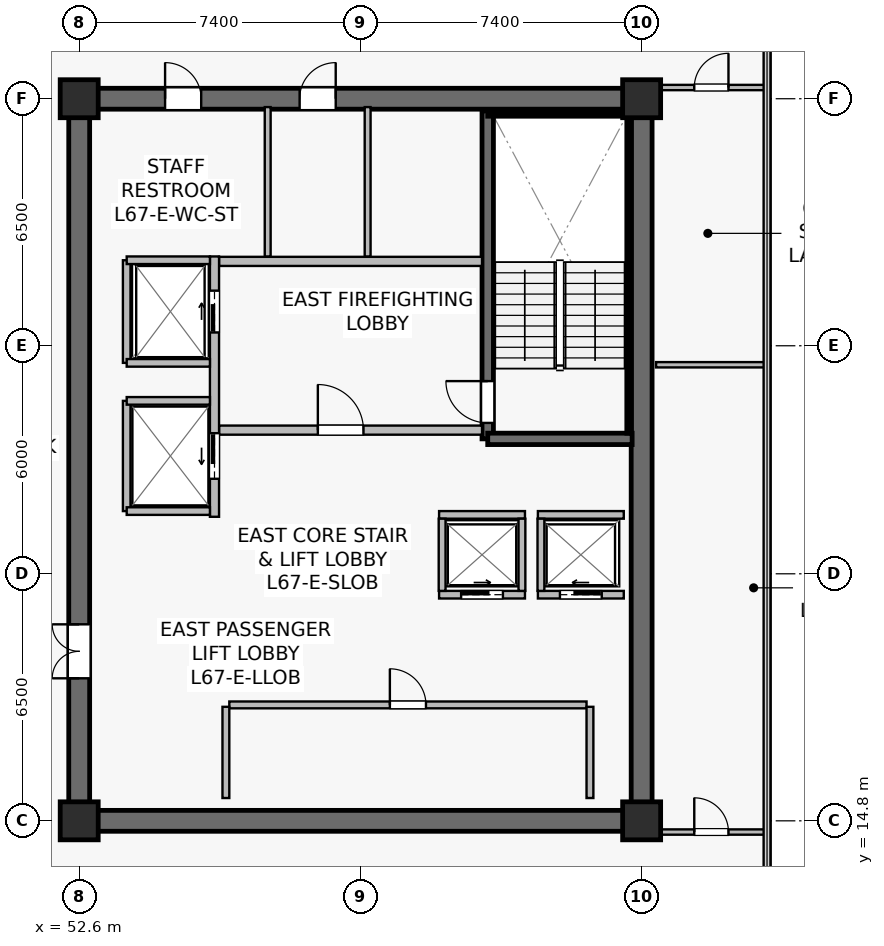
"""IFC4 building model, lengths in metres.
Left out: names, types, materials, properties, quantities, classifications, styles, units other than length and angle.
Written with IfcOpenShell. Run it as: python <this file> out.ifc"""

import sys

from ifc_helpers import new_model, si_unit, direction, frame, frame_2d, origin, origin_2d, place, context, subcontext, project, spatial, rectangle, extrude, source, transform, mapped, element, fill, save


model = new_model("IFC4")
c1 = context("Model", 3, precision=1e-05, world=origin(), true_north=direction((0.0, 1.0)))
c2 = subcontext(c1, "Body", "Model", "MODEL_VIEW")
j1 = project(units=[si_unit("LENGTHUNIT", "METRE"), si_unit("PLANEANGLEUNIT", "RADIAN")], contexts=[c1])
p1 = place(None, origin())
s1 = spatial("IfcSite", under=j1, at=p1, CompositionType="ELEMENT")
p2 = place(p1, origin())
s2 = spatial("IfcBuilding", under=s1, at=p2, CompositionType="ELEMENT")
p3 = place(p2, frame((0.0, 0.0, 279.3)))
s3 = spatial("IfcBuildingStorey", under=s2, at=p3, CompositionType="ELEMENT", Elevation=279.3)
p4 = place(p3, frame((52.325, 14.8, 0.0), z_axis=(0.0, 0.0, 1.0), x_axis=(1.0, 0.0, 0.0)))
e1 = element("IfcWall", 1, at=p4, inside=s3, PredefinedType="SHEAR", context=c2, shape_type="SweptSolid", body=[
    extrude(rectangle(XDim=15.35, YDim=0.55, at=frame_2d((7.675, 0.0))), origin(), (0.0, 0.0, 1.0), 3.8),
])
p5 = place(p3, frame((52.325, 33.8, 0.0), z_axis=(0.0, 0.0, 1.0), x_axis=(1.0, 0.0, 0.0)))
e2 = element("IfcWall", 2, at=p5, inside=s3, PredefinedType="SHEAR", context=c2, shape_type="SweptSolid", body=[
    extrude(rectangle(XDim=15.35, YDim=0.55, at=frame_2d((7.675, 0.0))), origin(), (0.0, 0.0, 1.0), 3.8),
])
p6 = place(p5, frame((6.075, 0.0, 0.0)))
e3 = element("IfcOpeningElement", 3, at=p6, cuts=e2, PredefinedType="OPENING", context=c2, shape_type="SweptSolid", body=[
    extrude(rectangle(XDim=0.95, YDim=2.15, at=frame_2d((0.475, 1.075))), frame((0.0, 0.285, 0.0), z_axis=(0.0, -1.0, 0.0), x_axis=(1.0, 0.0, 0.0)), (0.0, 0.0, 1.0), 0.57),
])
p7 = place(p5, frame((2.535, 0.0, 0.0)))
e4 = element("IfcOpeningElement", 4, at=p7, cuts=e2, PredefinedType="OPENING", context=c2, shape_type="SweptSolid", body=[
    extrude(rectangle(XDim=0.95, YDim=2.15, at=frame_2d((0.475, 1.075))), frame((0.0, 0.285, 0.0), z_axis=(0.0, -1.0, 0.0), x_axis=(1.0, 0.0, 0.0)), (0.0, 0.0, 1.0), 0.57),
])
p8 = place(p3, frame((52.6, 15.075, 0.0), z_axis=(0.0, 0.0, 1.0), x_axis=(0.0, 1.0, 0.0)))
e5 = element("IfcWall", 5, at=p8, inside=s3, PredefinedType="SHEAR", context=c2, shape_type="SweptSolid", body=[
    extrude(rectangle(XDim=18.45, YDim=0.55, at=frame_2d((9.225, 0.0))), origin(), (0.0, 0.0, 1.0), 3.8),
])
p9 = place(p8, frame((3.475, 0.0, 0.0)))
e6 = element("IfcOpeningElement", 6, at=p9, cuts=e5, PredefinedType="OPENING", context=c2, shape_type="SweptSolid", body=[
    extrude(rectangle(XDim=1.42, YDim=2.2, at=frame_2d((0.71, 1.1))), frame((0.0, 0.285, 0.0), z_axis=(0.0, -1.0, 0.0), x_axis=(1.0, 0.0, 0.0)), (0.0, 0.0, 1.0), 0.57),
])
p10 = place(p3, frame((67.4, 15.075, 0.0), z_axis=(0.0, 0.0, 1.0), x_axis=(0.0, 1.0, 0.0)))
e7 = element("IfcWall", 7, at=p10, inside=s3, PredefinedType="SHEAR", context=c2, shape_type="SweptSolid", body=[
    extrude(rectangle(XDim=18.45, YDim=0.55, at=frame_2d((9.225, 0.0))), origin(), (0.0, 0.0, 1.0), 3.8),
])
p11 = place(p3, frame((63.35, 24.85, 0.0), z_axis=(0.0, 0.0, 1.0), x_axis=(0.0, 1.0, 0.0)))
e8 = element("IfcWall", 8, at=p11, inside=s3, PredefinedType="SHEAR", context=c2, shape_type="SweptSolid", body=[
    extrude(rectangle(XDim=8.63, YDim=0.3, at=frame_2d((4.315, 0.0))), origin(), (0.0, 0.0, 1.0), 3.8),
])
p12 = place(p11, frame((0.42, 0.0, 0.0)))
e9 = element("IfcOpeningElement", 9, at=p12, cuts=e8, PredefinedType="OPENING", context=c2, shape_type="SweptSolid", body=[
    extrude(rectangle(XDim=1.1, YDim=2.15, at=frame_2d((0.55, 1.075))), frame((0.0, 0.16, 0.0), z_axis=(0.0, -1.0, 0.0), x_axis=(1.0, 0.0, 0.0)), (0.0, 0.0, 1.0), 0.32),
])
p13 = place(p3, frame((63.35, 24.85, 0.0), z_axis=(0.0, 0.0, 1.0), x_axis=(1.0, 0.0, 0.0)))
e10 = element("IfcWall", 10, at=p13, inside=s3, PredefinedType="SHEAR", context=c2, shape_type="SweptSolid", body=[
    extrude(rectangle(XDim=3.8, YDim=0.3, at=frame_2d((1.9, 0.0))), origin(), (0.0, 0.0, 1.0), 3.8),
])
p14 = place(p3, frame((63.35, 33.4, 0.0), z_axis=(0.0, 0.0, 1.0), x_axis=(1.0, 0.0, 0.0)))
e11 = element("IfcWall", 11, at=p14, inside=s3, PredefinedType="SOLIDWALL", context=c2, shape_type="SweptSolid", body=[
    extrude(rectangle(XDim=3.72, YDim=0.12, at=frame_2d((1.86, 0.0))), origin(), (0.0, 0.0, 1.0), 3.8),
])
p15 = place(p3, frame((67.07, 25.0, 0.0), z_axis=(0.0, 0.0, 1.0), x_axis=(0.0, 1.0, 0.0)))
e12 = element("IfcWall", 12, at=p15, inside=s3, PredefinedType="SOLIDWALL", context=c2, shape_type="SweptSolid", body=[
    extrude(rectangle(XDim=8.32, YDim=0.12, at=frame_2d((4.16, 0.0))), origin(), (0.0, 0.0, 1.0), 3.8),
])
m1 = source(origin(), c2, "Body", "SweptSolid", [
    extrude(rectangle(XDim=1.0, YDim=1.0, at=origin_2d()), origin(), (0.0, 0.0, 1.0), 4.1),
])
for number, where, z_axis, x_axis in (
    (13, (52.6, 14.8, 0.0), (0.0, 0.0, 1.0), (1.0, 0.0, 0.0)),
    (14, (67.4, 14.8, 0.0), (0.0, 0.0, 1.0), (1.0, 0.0, 0.0)),
    (15, (52.6, 33.8, 0.0), (0.0, 0.0, 1.0), (1.0, 0.0, 0.0)),
    (16, (67.4, 33.8, 0.0), (0.0, 0.0, 1.0), (1.0, 0.0, 0.0)),
):
    element("IfcColumn", number, at=place(p3, frame(where, z_axis=z_axis, x_axis=x_axis)), inside=s3, PredefinedType="COLUMN", context=c2, shape_type="MappedRepresentation", body=[
        mapped(m1, transform((0.0, 0.0, 0.0), scale=1.0)),
    ])
p16 = place(p3, frame((56.28, 25.08, 0.0), z_axis=(0.0, 0.0, 1.0), x_axis=(1.0, 0.0, 0.0)))
e17 = element("IfcWall", 17, at=p16, inside=s3, PredefinedType="SOLIDWALL", context=c2, shape_type="SweptSolid", body=[
    extrude(rectangle(XDim=6.92, YDim=0.24, at=frame_2d((3.46, 0.0))), origin(), (0.0, 0.0, 1.0), 3.197),
])
p17 = place(p16, frame((2.6, 0.0, 0.0)))
e18 = element("IfcOpeningElement", 18, at=p17, cuts=e17, PredefinedType="OPENING", context=c2, shape_type="SweptSolid", body=[
    extrude(rectangle(XDim=1.2, YDim=2.16, at=frame_2d((0.6, 1.08))), frame((0.0, 0.13, 0.0), z_axis=(0.0, -1.0, 0.0), x_axis=(1.0, 0.0, 0.0)), (0.0, 0.0, 1.0), 0.26),
])
p18 = place(p3, frame((56.28, 29.52, 0.0), z_axis=(0.0, 0.0, 1.0), x_axis=(1.0, 0.0, 0.0)))
e19 = element("IfcWall", 19, at=p18, inside=s3, PredefinedType="SOLIDWALL", context=c2, shape_type="SweptSolid", body=[
    extrude(rectangle(XDim=6.92, YDim=0.24, at=frame_2d((3.46, 0.0))), origin(), (0.0, 0.0, 1.0), 3.197),
])
p19 = place(p3, frame((56.16, 22.8, 0.0), z_axis=(0.0, 0.0, 1.0), x_axis=(0.0, 1.0, 0.0)))
e20 = element("IfcWall", 20, at=p19, inside=s3, PredefinedType="SOLIDWALL", context=c2, shape_type="SweptSolid", body=[
    extrude(rectangle(XDim=6.85, YDim=0.24, at=frame_2d((3.425, 0.0))), origin(), (0.0, 0.0, 1.0), 2.935),
])
p20 = place(p19, frame((4.85, 0.0, 0.0)))
e21 = element("IfcOpeningElement", 21, at=p20, cuts=e20, PredefinedType="OPENING", context=c2, shape_type="SweptSolid", body=[
    extrude(rectangle(XDim=1.1, YDim=2.22, at=frame_2d((0.55, 1.11))), frame((0.0, 0.13, 0.0), z_axis=(0.0, -1.0, 0.0), x_axis=(1.0, 0.0, 0.0)), (0.0, 0.0, 1.0), 0.26),
])
p21 = place(p19, frame((1.0, 0.0, 0.0)))
e22 = element("IfcOpeningElement", 22, at=p21, cuts=e20, PredefinedType="OPENING", context=c2, shape_type="SweptSolid", body=[
    extrude(rectangle(XDim=1.2, YDim=2.22, at=frame_2d((0.6, 1.11))), frame((0.0, 0.13, 0.0), z_axis=(0.0, -1.0, 0.0), x_axis=(1.0, 0.0, 0.0)), (0.0, 0.0, 1.0), 0.26),
])
p22 = place(p3, frame((64.67, 20.75, 0.0), z_axis=(0.0, 0.0, 1.0), x_axis=(1.0, 0.0, 0.0)))
e23 = element("IfcWall", 23, at=p22, inside=s3, PredefinedType="SOLIDWALL", context=c2, shape_type="SweptSolid", body=[
    extrude(rectangle(XDim=2.26, YDim=0.2, at=frame_2d((1.13, 0.0))), origin(), (0.0, 0.0, 1.0), 3.8),
])
p23 = place(p22, frame((0.58, 0.0, 0.0)))
e24 = element("IfcOpeningElement", 24, at=p23, cuts=e23, PredefinedType="OPENING", context=c2, shape_type="SweptSolid", body=[
    extrude(rectangle(XDim=1.1, YDim=2.22, at=frame_2d((0.55, 1.11))), frame((0.0, 0.11, 0.0), z_axis=(0.0, -1.0, 0.0), x_axis=(1.0, 0.0, 0.0)), (0.0, 0.0, 1.0), 0.22),
])
p24 = place(p3, frame((64.67, 22.85, 0.0), z_axis=(0.0, 0.0, 1.0), x_axis=(1.0, 0.0, 0.0)))
e25 = element("IfcWall", 25, at=p24, inside=s3, PredefinedType="SOLIDWALL", context=c2, shape_type="SweptSolid", body=[
    extrude(rectangle(XDim=2.26, YDim=0.2, at=frame_2d((1.13, 0.0))), origin(), (0.0, 0.0, 1.0), 3.8),
])
p25 = place(p3, frame((64.75, 20.85, 0.0), z_axis=(0.0, 0.0, 1.0), x_axis=(0.0, 1.0, 0.0)))
e26 = element("IfcWall", 26, at=p25, inside=s3, PredefinedType="SOLIDWALL", context=c2, shape_type="SweptSolid", body=[
    extrude(rectangle(XDim=1.9, YDim=0.18, at=frame_2d((0.95, 0.0))), origin(), (0.0, 0.0, 1.0), 3.8),
])
p26 = place(p3, frame((62.07, 20.75, 0.0), z_axis=(0.0, 0.0, 1.0), x_axis=(1.0, 0.0, 0.0)))
e27 = element("IfcWall", 27, at=p26, inside=s3, PredefinedType="SOLIDWALL", context=c2, shape_type="SweptSolid", body=[
    extrude(rectangle(XDim=2.26, YDim=0.2, at=frame_2d((1.13, 0.0))), origin(), (0.0, 0.0, 1.0), 3.8),
])
p27 = place(p26, frame((0.58, 0.0, 0.0)))
e28 = element("IfcOpeningElement", 28, at=p27, cuts=e27, PredefinedType="OPENING", context=c2, shape_type="SweptSolid", body=[
    extrude(rectangle(XDim=1.1, YDim=2.22, at=frame_2d((0.55, 1.11))), frame((0.0, 0.11, 0.0), z_axis=(0.0, -1.0, 0.0), x_axis=(1.0, 0.0, 0.0)), (0.0, 0.0, 1.0), 0.22),
])
p28 = place(p3, frame((62.07, 22.85, 0.0), z_axis=(0.0, 0.0, 1.0), x_axis=(1.0, 0.0, 0.0)))
e29 = element("IfcWall", 29, at=p28, inside=s3, PredefinedType="SOLIDWALL", context=c2, shape_type="SweptSolid", body=[
    extrude(rectangle(XDim=2.26, YDim=0.2, at=frame_2d((1.13, 0.0))), origin(), (0.0, 0.0, 1.0), 3.8),
])
for number, where, z_axis, x_axis in (
    (30, (62.15, 20.85, 0.0), (0.0, 0.0, 1.0), (0.0, 1.0, 0.0)),
    (31, (64.25, 20.85, 0.0), (0.0, 0.0, 1.0), (0.0, 1.0, 0.0)),
):
    element("IfcWall", number, at=place(p3, frame(where, z_axis=z_axis, x_axis=x_axis)), inside=s3, PredefinedType="SOLIDWALL", context=c2, shape_type="SweptSolid", body=[
        extrude(rectangle(XDim=1.9, YDim=0.18, at=frame_2d((0.95, 0.0))), origin(), (0.0, 0.0, 1.0), 3.8),
    ])
p29 = place(p3, frame((53.85, 26.85, 0.0), z_axis=(0.0, 0.0, 1.0), x_axis=(0.0, 1.0, 0.0)))
e32 = element("IfcWall", 32, at=p29, inside=s3, PredefinedType="SOLIDWALL", context=c2, shape_type="SweptSolid", body=[
    extrude(rectangle(XDim=2.7, YDim=0.2, at=frame_2d((1.35, 0.0))), origin(), (0.0, 0.0, 1.0), 3.8),
])
p30 = place(p3, frame((53.85, 29.55, 0.0), z_axis=(0.0, 0.0, 1.0), x_axis=(1.0, 0.0, 0.0)))
e33 = element("IfcWall", 33, at=p30, inside=s3, PredefinedType="SOLIDWALL", context=c2, shape_type="SweptSolid", body=[
    extrude(rectangle(XDim=2.19, YDim=0.2, at=frame_2d((1.095, 0.0))), origin(), (0.0, 0.0, 1.0), 3.8),
])
p31 = place(p3, frame((53.85, 26.85, 0.0), z_axis=(0.0, 0.0, 1.0), x_axis=(1.0, 0.0, 0.0)))
e34 = element("IfcWall", 34, at=p31, inside=s3, PredefinedType="SOLIDWALL", context=c2, shape_type="SweptSolid", body=[
    extrude(rectangle(XDim=2.19, YDim=0.2, at=frame_2d((1.095, 0.0))), origin(), (0.0, 0.0, 1.0), 3.197),
])
p32 = place(p3, frame((53.85, 22.95, 0.0), z_axis=(0.0, 0.0, 1.0), x_axis=(0.0, 1.0, 0.0)))
e35 = element("IfcWall", 35, at=p32, inside=s3, PredefinedType="SOLIDWALL", context=c2, shape_type="SweptSolid", body=[
    extrude(rectangle(XDim=2.9, YDim=0.2, at=frame_2d((1.45, 0.0))), origin(), (0.0, 0.0, 1.0), 2.935),
])
for number, where, z_axis, x_axis in (
    (36, (53.85, 25.85, 0.0), (0.0, 0.0, 1.0), (1.0, 0.0, 0.0)),
    (37, (53.85, 22.95, 0.0), (0.0, 0.0, 1.0), (1.0, 0.0, 0.0)),
):
    element("IfcWall", number, at=place(p3, frame(where, z_axis=z_axis, x_axis=x_axis)), inside=s3, PredefinedType="SOLIDWALL", context=c2, shape_type="SweptSolid", body=[
        extrude(rectangle(XDim=2.19, YDim=0.2, at=frame_2d((1.095, 0.0))), origin(), (0.0, 0.0, 1.0), 3.8),
    ])
p33 = place(p3, frame((56.55, 17.85, 0.0), z_axis=(0.0, 0.0, 1.0), x_axis=(1.0, 0.0, 0.0)))
e38 = element("IfcWall", 38, at=p33, inside=s3, PredefinedType="SOLIDWALL", context=c2, shape_type="SweptSolid", body=[
    extrude(rectangle(XDim=9.4, YDim=0.18, at=frame_2d((4.7, 0.0))), origin(), (0.0, 0.0, 1.0), 3.197),
])
p34 = place(p33, frame((4.225, 0.0, 0.0)))
e39 = element("IfcOpeningElement", 39, at=p34, cuts=e38, PredefinedType="OPENING", context=c2, shape_type="SweptSolid", body=[
    extrude(rectangle(XDim=0.95, YDim=2.15, at=frame_2d((0.475, 1.075))), frame((0.0, 0.1, 0.0), z_axis=(0.0, -1.0, 0.0), x_axis=(1.0, 0.0, 0.0)), (0.0, 0.0, 1.0), 0.2),
])
for number, where, z_axis, x_axis in (
    (40, (56.46, 15.4, 0.0), (0.0, 0.0, 1.0), (0.0, 1.0, 0.0)),
    (41, (66.04, 15.4, 0.0), (0.0, 0.0, 1.0), (0.0, 1.0, 0.0)),
):
    element("IfcWall", number, at=place(p3, frame(where, z_axis=z_axis, x_axis=x_axis)), inside=s3, PredefinedType="SOLIDWALL", context=c2, shape_type="SweptSolid", body=[
        extrude(rectangle(XDim=2.4, YDim=0.18, at=frame_2d((1.2, 0.0))), origin(), (0.0, 0.0, 1.0), 3.8),
    ])
p35 = place(p3, frame((60.19, 29.65, 0.0), z_axis=(0.0, 0.0, 1.0), x_axis=(0.0, 1.0, 0.0)))
e42 = element("IfcWall", 42, at=p35, inside=s3, PredefinedType="PLUMBINGWALL", context=c2, shape_type="SweptSolid", body=[
    extrude(rectangle(XDim=3.93, YDim=0.155, at=frame_2d((1.965, 0.0))), origin(), (0.0, 0.0, 1.0), 3.197),
])
p36 = place(p3, frame((57.56, 29.65, 0.0), z_axis=(0.0, 0.0, 1.0), x_axis=(0.0, 1.0, 0.0)))
e43 = element("IfcWall", 43, at=p36, inside=s3, PredefinedType="PLUMBINGWALL", context=c2, shape_type="SweptSolid", body=[
    extrude(rectangle(XDim=3.93, YDim=0.155, at=frame_2d((1.965, 0.0))), origin(), (0.0, 0.0, 1.0), 3.8),
])
p37 = place(p3, frame((67.78, 26.8, 0.0), z_axis=(0.0, 0.0, 1.0), x_axis=(1.0, 0.0, 0.0)))
e44 = element("IfcWall", 44, at=p37, inside=s3, PredefinedType="PARTITIONING", context=c2, shape_type="SweptSolid", body=[
    extrude(rectangle(XDim=2.91, YDim=0.14, at=frame_2d((1.455, 0.0))), origin(), (0.0, 0.0, 1.0), 3.8),
])
p38 = place(p3, frame((67.78, 14.505, 0.0), z_axis=(0.0, 0.0, 1.0), x_axis=(1.0, 0.0, 0.0)))
e45 = element("IfcWall", 45, at=p38, inside=s3, PredefinedType="PARTITIONING", context=c2, shape_type="SweptSolid", body=[
    extrude(rectangle(XDim=2.91, YDim=0.14, at=frame_2d((1.455, 0.0))), origin(), (0.0, 0.0, 1.0), 3.8),
])
p39 = place(p38, frame((1.005, 0.0, 0.0)))
e46 = element("IfcOpeningElement", 46, at=p39, cuts=e45, PredefinedType="OPENING", context=c2, shape_type="SweptSolid", body=[
    extrude(rectangle(XDim=0.9, YDim=2.1, at=frame_2d((0.45, 1.05))), frame((0.0, 0.08, 0.0), z_axis=(0.0, -1.0, 0.0), x_axis=(1.0, 0.0, 0.0)), (0.0, 0.0, 1.0), 0.16),
])
p40 = place(p3, frame((67.78, 34.095, 0.0), z_axis=(0.0, 0.0, 1.0), x_axis=(1.0, 0.0, 0.0)))
e47 = element("IfcWall", 47, at=p40, inside=s3, PredefinedType="PARTITIONING", context=c2, shape_type="SweptSolid", body=[
    extrude(rectangle(XDim=2.91, YDim=0.14, at=frame_2d((1.455, 0.0))), origin(), (0.0, 0.0, 1.0), 3.8),
])
p41 = place(p40, frame((1.005, 0.0, 0.0)))
e48 = element("IfcOpeningElement", 48, at=p41, cuts=e47, PredefinedType="OPENING", context=c2, shape_type="SweptSolid", body=[
    extrude(rectangle(XDim=0.9, YDim=2.1, at=frame_2d((0.45, 1.05))), frame((0.0, 0.08, 0.0), z_axis=(0.0, -1.0, 0.0), x_axis=(1.0, 0.0, 0.0)), (0.0, 0.0, 1.0), 0.16),
])
m2 = source(origin(), c2, "Body", "SweptSolid", [
    extrude(rectangle(XDim=1.1, YDim=2.15, at=frame_2d((0.55, 1.075))), frame((0.0, 0.025, 0.0), z_axis=(0.0, -1.0, 0.0), x_axis=(1.0, 0.0, 0.0)), (0.0, 0.0, 1.0), 0.05),
])
p42 = place(p12, origin())
e49 = element("IfcDoor", 49, at=p42, inside=s3, OperationType="SINGLE_SWING_RIGHT", PredefinedType="DOOR", context=c2, shape_type="MappedRepresentation", body=[
    mapped(m2, transform((0.0, 0.0, 0.0), scale=1.0)),
])
fill(e9, e49)
m3 = source(origin(), c2, "Body", "SweptSolid", [
    extrude(rectangle(XDim=1.2, YDim=2.16, at=frame_2d((0.6, 1.08))), frame((0.0, 0.025, 0.0), z_axis=(0.0, -1.0, 0.0), x_axis=(1.0, 0.0, 0.0)), (0.0, 0.0, 1.0), 0.05),
])
p43 = place(p17, origin())
e50 = element("IfcDoor", 50, at=p43, inside=s3, OperationType="SINGLE_SWING_LEFT", PredefinedType="DOOR", context=c2, shape_type="MappedRepresentation", body=[
    mapped(m3, transform((0.0, 0.0, 0.0), scale=1.0)),
])
fill(e18, e50)
m4 = source(origin(), c2, "Body", "SweptSolid", [
    extrude(rectangle(XDim=1.1, YDim=2.22, at=frame_2d((0.55, 1.11))), frame((0.0, 0.025, 0.0), z_axis=(0.0, -1.0, 0.0), x_axis=(1.0, 0.0, 0.0)), (0.0, 0.0, 1.0), 0.05),
])
p44 = place(p23, origin())
e51 = element("IfcDoor", 51, at=p44, inside=s3, OperationType="SLIDING_TO_LEFT", PredefinedType="USERDEFINED", context=c2, shape_type="MappedRepresentation", body=[
    mapped(m4, transform((0.0, 0.0, 0.0), scale=1.0)),
])
fill(e24, e51)
p45 = place(p27, origin())
e52 = element("IfcDoor", 52, at=p45, inside=s3, OperationType="SLIDING_TO_RIGHT", PredefinedType="USERDEFINED", context=c2, shape_type="MappedRepresentation", body=[
    mapped(m4, transform((0.0, 0.0, 0.0), scale=1.0)),
])
fill(e28, e52)
p46 = place(p20, origin())
e53 = element("IfcDoor", 53, at=p46, inside=s3, OperationType="SLIDING_TO_RIGHT", PredefinedType="USERDEFINED", context=c2, shape_type="MappedRepresentation", body=[
    mapped(m4, transform((0.0, 0.0, 0.0), scale=1.0)),
])
fill(e21, e53)
m5 = source(origin(), c2, "Body", "SweptSolid", [
    extrude(rectangle(XDim=1.2, YDim=2.22, at=frame_2d((0.6, 1.11))), frame((0.0, 0.025, 0.0), z_axis=(0.0, -1.0, 0.0), x_axis=(1.0, 0.0, 0.0)), (0.0, 0.0, 1.0), 0.05),
])
p47 = place(p21, origin())
e54 = element("IfcDoor", 54, at=p47, inside=s3, OperationType="SLIDING_TO_LEFT", PredefinedType="USERDEFINED", context=c2, shape_type="MappedRepresentation", body=[
    mapped(m5, transform((0.0, 0.0, 0.0), scale=1.0)),
])
fill(e22, e54)
m6 = source(origin(), c2, "Body", "SweptSolid", [
    extrude(rectangle(XDim=0.95, YDim=2.15, at=frame_2d((0.475, 1.075))), frame((0.0, 0.025, 0.0), z_axis=(0.0, -1.0, 0.0), x_axis=(1.0, 0.0, 0.0)), (0.0, 0.0, 1.0), 0.05),
])
p48 = place(p34, origin())
e55 = element("IfcDoor", 55, at=p48, inside=s3, OperationType="SINGLE_SWING_LEFT", PredefinedType="DOOR", context=c2, shape_type="MappedRepresentation", body=[
    mapped(m6, transform((0.0, 0.0, 0.0), scale=1.0)),
])
fill(e39, e55)
m7 = source(origin(), c2, "Body", "SweptSolid", [
    extrude(rectangle(XDim=1.42, YDim=2.2, at=frame_2d((0.71, 1.1))), frame((0.0, 0.025, 0.0), z_axis=(0.0, -1.0, 0.0), x_axis=(1.0, 0.0, 0.0)), (0.0, 0.0, 1.0), 0.05),
])
p49 = place(p9, origin())
e56 = element("IfcDoor", 56, at=p49, inside=s3, OperationType="DOUBLE_DOOR_SINGLE_SWING", PredefinedType="DOOR", context=c2, shape_type="MappedRepresentation", body=[
    mapped(m7, transform((0.0, 0.0, 0.0), scale=1.0)),
])
fill(e6, e56)
p50 = place(p6, origin())
e57 = element("IfcDoor", 57, at=p50, inside=s3, OperationType="SINGLE_SWING_RIGHT", PredefinedType="DOOR", context=c2, shape_type="MappedRepresentation", body=[
    mapped(m6, transform((0.0, 0.0, 0.0), scale=1.0)),
])
fill(e3, e57)
p51 = place(p7, origin())
e58 = element("IfcDoor", 58, at=p51, inside=s3, OperationType="SINGLE_SWING_LEFT", PredefinedType="DOOR", context=c2, shape_type="MappedRepresentation", body=[
    mapped(m6, transform((0.0, 0.0, 0.0), scale=1.0)),
])
fill(e4, e58)
m8 = source(origin(), c2, "Body", "SweptSolid", [
    extrude(rectangle(XDim=0.9, YDim=2.1, at=frame_2d((0.45, 1.05))), frame((0.0, 0.025, 0.0), z_axis=(0.0, -1.0, 0.0), x_axis=(1.0, 0.0, 0.0)), (0.0, 0.0, 1.0), 0.05),
])
p52 = place(p39, origin())
e59 = element("IfcDoor", 59, at=p52, inside=s3, OperationType="SINGLE_SWING_LEFT", PredefinedType="DOOR", context=c2, shape_type="MappedRepresentation", body=[
    mapped(m8, transform((0.0, 0.0, 0.0), scale=1.0)),
])
fill(e46, e59)
p53 = place(p41, origin())
e60 = element("IfcDoor", 60, at=p53, inside=s3, OperationType="SINGLE_SWING_RIGHT", PredefinedType="DOOR", context=c2, shape_type="MappedRepresentation", body=[
    mapped(m8, transform((0.0, 0.0, 0.0), scale=1.0)),
])
fill(e48, e60)
save(model, sys.argv[1])
